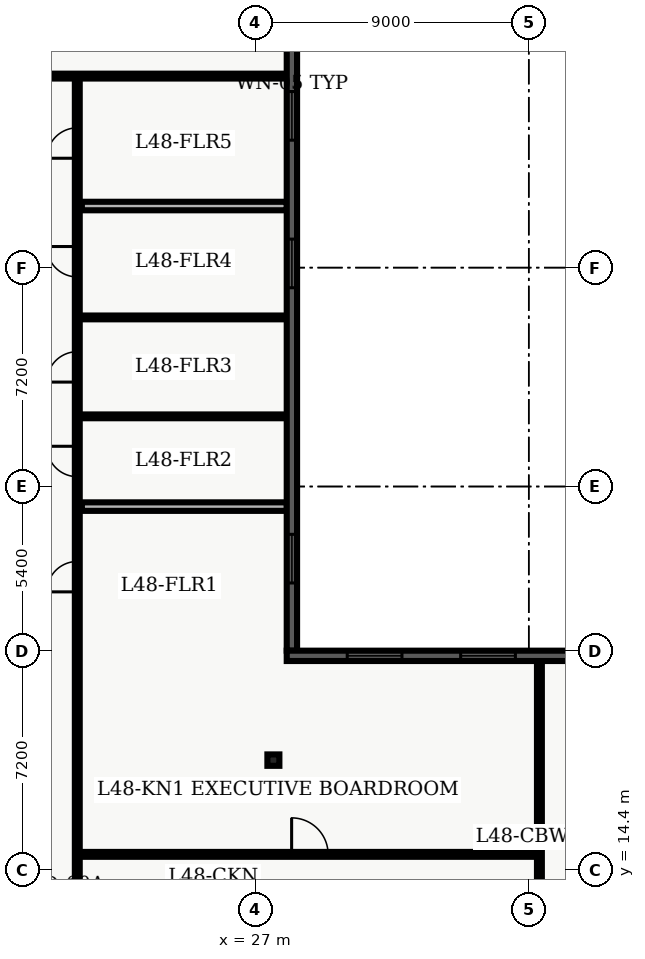
"""IFC4 building model, lengths in metres.
Left out: names, types, materials, properties, quantities, classifications, styles, units other than length and angle.
Written with IfcOpenShell. Run it as: python <this file> out.ifc"""

import sys

from ifc_helpers import new_model, entity, si_unit, converted_unit, direction, frame, origin_with_axes, origin_2d_with_axis, place, context, subcontext, project, spatial, polyline, rectangle, i_section, outline, extrude, element, fill, save


model = new_model("IFC4")
c1 = context("Model", 3, precision=1e-05, world=origin_with_axes(), true_north=direction((0.0, 1.0)))
c2 = subcontext(c1, "Body", "Model", "MODEL_VIEW")
j1 = project(units=[si_unit("LENGTHUNIT", "METRE"), converted_unit("PLANEANGLEUNIT", "DEGREE", entity("IfcPlaneAngleMeasure", 0.017), si_unit("PLANEANGLEUNIT", "RADIAN"), dimensions=[0, 0, 0, 0, 0, 0, 0])], contexts=[c1])
p1 = place(None, origin_with_axes())
s1 = spatial("IfcSite", under=j1, at=p1, CompositionType="ELEMENT")
p2 = place(p1, origin_with_axes())
s2 = spatial("IfcBuilding", under=s1, at=p2, CompositionType="ELEMENT")
p3 = place(p2, frame((0.0, 0.0, 196.5), z_axis=(0.0, 0.0, 1.0), x_axis=(1.0, 0.0, 0.0)))
s3 = spatial("IfcBuildingStorey", under=s2, at=p3, CompositionType="ELEMENT", Elevation=196.5)
p4 = place(p3, frame((27.6, 18.0, 0.0), z_axis=(0.0, 0.0, 1.0), x_axis=(1.0, 0.0, 0.0)))
e1 = element("IfcColumn", 1, at=p4, inside=s3, PredefinedType="COLUMN", context=c2, shape_type="SweptSolid", body=[
    extrude(i_section(OverallWidth=0.394, OverallDepth=0.375, WebThickness=0.017, FlangeThickness=0.028, FilletRadius=0.02, at=origin_2d_with_axis()), origin_with_axes(), (0.0, 0.0, 1.0), 3.9),
])
p5 = place(p3, frame((2.6, 40.5, 0.0), z_axis=(0.0, 0.0, 1.0), x_axis=(1.0, 0.0, 0.0)))
e2 = element("IfcWall", 2, at=p5, inside=s3, PredefinedType="PARTITIONING", context=c2, shape_type="SweptSolid", body=[
    extrude(outline(polyline([(0.0, -0.08), (25.444, -0.08), (25.444, 0.08), (0.0, 0.08), (0.0, -0.08)])), origin_with_axes(), (0.0, 0.0, 1.0), 2.7),
])
p6 = place(p5, frame((1.762, 0.0, 0.0), z_axis=(0.0, 0.0, 1.0), x_axis=(1.0, 0.0, 0.0)))
e3 = element("IfcOpeningElement", 3, at=p6, cuts=e2, PredefinedType="OPENING", context=c2, shape_type="SweptSolid", body=[
    extrude(rectangle(XDim=1.0, YDim=0.18, at=origin_2d_with_axis()), origin_with_axes(), (0.0, 0.0, 1.0), 2.15),
])
p7 = place(p5, frame((6.167, 0.0, 0.0), z_axis=(0.0, 0.0, 1.0), x_axis=(1.0, 0.0, 0.0)))
e4 = element("IfcOpeningElement", 4, at=p7, cuts=e2, PredefinedType="OPENING", context=c2, shape_type="SweptSolid", body=[
    extrude(rectangle(XDim=1.0, YDim=0.18, at=origin_2d_with_axis()), origin_with_axes(), (0.0, 0.0, 1.0), 2.15),
])
p8 = place(p5, frame((10.413, 0.0, 0.0), z_axis=(0.0, 0.0, 1.0), x_axis=(1.0, 0.0, 0.0)))
e5 = element("IfcOpeningElement", 5, at=p8, cuts=e2, PredefinedType="OPENING", context=c2, shape_type="SweptSolid", body=[
    extrude(rectangle(XDim=1.0, YDim=0.18, at=origin_2d_with_axis()), origin_with_axes(), (0.0, 0.0, 1.0), 2.15),
])
p9 = place(p5, frame((14.773, 0.0, 0.0), z_axis=(0.0, 0.0, 1.0), x_axis=(1.0, 0.0, 0.0)))
e6 = element("IfcOpeningElement", 6, at=p9, cuts=e2, PredefinedType="OPENING", context=c2, shape_type="SweptSolid", body=[
    extrude(rectangle(XDim=1.0, YDim=0.18, at=origin_2d_with_axis()), origin_with_axes(), (0.0, 0.0, 1.0), 2.15),
])
p10 = place(p3, frame((21.15, 7.8, 0.0), z_axis=(0.0, 0.0, 1.0), x_axis=(0.0, 1.0, 0.0)))
e7 = element("IfcWall", 7, at=p10, inside=s3, PredefinedType="PARTITIONING", context=c2, shape_type="SweptSolid", body=[
    extrude(outline(polyline([(0.0, -0.08), (32.7, -0.08), (32.7, 0.08), (0.0, 0.08), (0.0, -0.08)])), origin_with_axes(), (0.0, 0.0, 1.0), 2.7),
])
p11 = place(p10, frame((16.235, 0.0, 0.0), z_axis=(0.0, 0.0, 1.0), x_axis=(1.0, 0.0, 0.0)))
e8 = element("IfcOpeningElement", 8, at=p11, cuts=e7, PredefinedType="OPENING", context=c2, shape_type="SweptSolid", body=[
    extrude(rectangle(XDim=1.0, YDim=0.18, at=origin_2d_with_axis()), origin_with_axes(), (0.0, 0.0, 1.0), 2.15),
])
p12 = place(p10, frame((20.023, 0.0, 0.0), z_axis=(0.0, 0.0, 1.0), x_axis=(1.0, 0.0, 0.0)))
e9 = element("IfcOpeningElement", 9, at=p12, cuts=e7, PredefinedType="OPENING", context=c2, shape_type="SweptSolid", body=[
    extrude(rectangle(XDim=1.0, YDim=0.18, at=origin_2d_with_axis()), origin_with_axes(), (0.0, 0.0, 1.0), 2.15),
])
p13 = place(p10, frame((23.135, 0.0, 0.0), z_axis=(0.0, 0.0, 1.0), x_axis=(1.0, 0.0, 0.0)))
e10 = element("IfcOpeningElement", 10, at=p13, cuts=e7, PredefinedType="OPENING", context=c2, shape_type="SweptSolid", body=[
    extrude(rectangle(XDim=1.0, YDim=0.18, at=origin_2d_with_axis()), origin_with_axes(), (0.0, 0.0, 1.0), 2.15),
])
p14 = place(p10, frame((26.594, 0.0, 0.0), z_axis=(0.0, 0.0, 1.0), x_axis=(1.0, 0.0, 0.0)))
e11 = element("IfcOpeningElement", 11, at=p14, cuts=e7, PredefinedType="OPENING", context=c2, shape_type="SweptSolid", body=[
    extrude(rectangle(XDim=1.0, YDim=0.18, at=origin_2d_with_axis()), origin_with_axes(), (0.0, 0.0, 1.0), 2.15),
])
p15 = place(p10, frame((30.498, 0.0, 0.0), z_axis=(0.0, 0.0, 1.0), x_axis=(1.0, 0.0, 0.0)))
e12 = element("IfcOpeningElement", 12, at=p15, cuts=e7, PredefinedType="OPENING", context=c2, shape_type="SweptSolid", body=[
    extrude(rectangle(XDim=1.0, YDim=0.18, at=origin_2d_with_axis()), origin_with_axes(), (0.0, 0.0, 1.0), 2.15),
])
p16 = place(p10, frame((5.775, 0.0, 0.0), z_axis=(0.0, 0.0, 1.0), x_axis=(1.0, 0.0, 0.0)))
e13 = element("IfcOpeningElement", 13, at=p16, cuts=e7, PredefinedType="OPENING", context=c2, shape_type="SweptSolid", body=[
    extrude(rectangle(XDim=1.05, YDim=0.18, at=origin_2d_with_axis()), origin_with_axes(), (0.0, 0.0, 1.0), 2.15),
])
p17 = place(p3, frame((21.3, 26.339, 0.0), z_axis=(0.0, 0.0, 1.0), x_axis=(1.0, 0.0, 0.0)))
e14 = element("IfcWall", 14, at=p17, inside=s3, PredefinedType="PARTITIONING", context=c2, shape_type="SweptSolid", body=[
    extrude(outline(polyline([(0.0, -0.14), (6.744, -0.14), (6.744, 0.14), (0.0, 0.14), (0.0, -0.14)])), origin_with_axes(), (0.0, 0.0, 1.0), 2.7),
])
for number, where, z_axis, x_axis in (
    (15, (21.3, 29.308, 0.0), (0.0, 0.0, 1.0), (1.0, 0.0, 0.0)),
    (16, (21.3, 32.562, 0.0), (0.0, 0.0, 1.0), (1.0, 0.0, 0.0)),
):
    element("IfcWall", number, at=place(p3, frame(where, z_axis=z_axis, x_axis=x_axis)), inside=s3, PredefinedType="PARTITIONING", context=c2, shape_type="SweptSolid", body=[
        extrude(outline(polyline([(0.0, -0.062), (6.744, -0.062), (6.744, 0.062), (0.0, 0.062), (0.0, -0.062)])), origin_with_axes(), (0.0, 0.0, 1.0), 2.7),
    ])
p18 = place(p3, frame((21.3, 36.226, 0.0), z_axis=(0.0, 0.0, 1.0), x_axis=(1.0, 0.0, 0.0)))
e17 = element("IfcWall", 17, at=p18, inside=s3, PredefinedType="PARTITIONING", context=c2, shape_type="SweptSolid", body=[
    extrude(outline(polyline([(0.0, -0.14), (6.744, -0.14), (6.744, 0.14), (0.0, 0.14), (0.0, -0.14)])), origin_with_axes(), (0.0, 0.0, 1.0), 2.7),
])
p19 = place(p3, frame((21.15, 14.9, 0.0), z_axis=(0.0, 0.0, 1.0), x_axis=(1.0, 0.0, 0.0)))
e18 = element("IfcWall", 18, at=p19, inside=s3, PredefinedType="PARTITIONING", context=c2, shape_type="SweptSolid", body=[
    extrude(outline(polyline([(0.0, -0.08), (15.2, -0.08), (15.2, 0.08), (0.0, 0.08), (0.0, -0.08)])), origin_with_axes(), (0.0, 0.0, 1.0), 2.7),
])
p20 = place(p19, frame((7.65, 0.0, 0.0), z_axis=(0.0, 0.0, 1.0), x_axis=(1.0, 0.0, 0.0)))
e19 = element("IfcOpeningElement", 19, at=p20, cuts=e18, PredefinedType="OPENING", context=c2, shape_type="SweptSolid", body=[
    extrude(rectangle(XDim=1.2, YDim=0.18, at=origin_2d_with_axis()), origin_with_axes(), (0.0, 0.0, 1.0), 2.2),
])
p21 = place(p3, frame((36.35, 4.35, 0.0), z_axis=(0.0, 0.0, 1.0), x_axis=(0.0, 1.0, 0.0)))
e20 = element("IfcWall", 20, at=p21, inside=s3, PredefinedType="PARTITIONING", context=c2, shape_type="SweptSolid", body=[
    extrude(outline(polyline([(0.0, -0.08), (16.95, -0.08), (16.95, 0.08), (0.0, 0.08), (0.0, -0.08)])), origin_with_axes(), (0.0, 0.0, 1.0), 2.7),
])
p22 = place(p3, frame((28.209, 42.22, 0.0), z_axis=(0.0, 0.0, 1.0), x_axis=(0.0, -1.0, 0.0)))
e21 = element("IfcWall", 21, at=p22, inside=s3, PredefinedType="SOLIDWALL", context=c2, shape_type="SweptSolid", body=[
    extrude(outline(polyline([(0.0, -0.17), (20.62, -0.17), (20.62, 0.17), (0.0, 0.17), (0.0, -0.17)])), origin_with_axes(), (0.0, 0.0, 1.0), 3.66),
])
p23 = place(p22, frame((3.028, 0.0, 0.45), z_axis=(0.0, 0.0, 1.0), x_axis=(1.0, 0.0, 0.0)))
e22 = element("IfcOpeningElement", 22, at=p23, cuts=e21, PredefinedType="OPENING", context=c2, shape_type="SweptSolid", body=[
    extrude(rectangle(XDim=1.6, YDim=0.36, at=origin_2d_with_axis()), origin_with_axes(), (0.0, 0.0, 1.0), 2.2),
])
p24 = place(p22, frame((7.882, 0.0, 0.45), z_axis=(0.0, 0.0, 1.0), x_axis=(1.0, 0.0, 0.0)))
e23 = element("IfcOpeningElement", 23, at=p24, cuts=e21, PredefinedType="OPENING", context=c2, shape_type="SweptSolid", body=[
    extrude(rectangle(XDim=1.6, YDim=0.36, at=origin_2d_with_axis()), origin_with_axes(), (0.0, 0.0, 1.0), 2.2),
])
p25 = place(p22, frame((17.593, 0.0, 0.45), z_axis=(0.0, 0.0, 1.0), x_axis=(1.0, 0.0, 0.0)))
e24 = element("IfcOpeningElement", 24, at=p25, cuts=e21, PredefinedType="OPENING", context=c2, shape_type="SweptSolid", body=[
    extrude(rectangle(XDim=1.6, YDim=0.36, at=origin_2d_with_axis()), origin_with_axes(), (0.0, 0.0, 1.0), 2.2),
])
p26 = place(p3, frame((28.039, 21.43, 0.0), z_axis=(0.0, 0.0, 1.0), x_axis=(1.0, 0.0, 0.0)))
e25 = element("IfcWall", 25, at=p26, inside=s3, PredefinedType="SOLIDWALL", context=c2, shape_type="SweptSolid", body=[
    extrude(outline(polyline([(0.0, -0.17), (10.361, -0.17), (10.361, 0.17), (0.0, 0.17), (0.0, -0.17)])), origin_with_axes(), (0.0, 0.0, 1.0), 3.66),
])
p27 = place(p26, frame((2.89, 0.0, 0.45), z_axis=(0.0, 0.0, 1.0), x_axis=(1.0, 0.0, 0.0)))
e26 = element("IfcOpeningElement", 26, at=p27, cuts=e25, PredefinedType="OPENING", context=c2, shape_type="SweptSolid", body=[
    extrude(rectangle(XDim=1.8, YDim=0.36, at=origin_2d_with_axis()), origin_with_axes(), (0.0, 0.0, 1.0), 2.1),
])
p28 = place(p26, frame((6.621, 0.0, 0.45), z_axis=(0.0, 0.0, 1.0), x_axis=(1.0, 0.0, 0.0)))
e27 = element("IfcOpeningElement", 27, at=p28, cuts=e25, PredefinedType="OPENING", context=c2, shape_type="SweptSolid", body=[
    extrude(rectangle(XDim=1.8, YDim=0.36, at=origin_2d_with_axis()), origin_with_axes(), (0.0, 0.0, 1.0), 2.1),
])
p29 = place(p10, frame((16.235, 0.0, 0.0), z_axis=(0.0, 0.0, 1.0), x_axis=(1.0, 0.0, 0.0)))
e28 = element("IfcDoor", 28, at=p29, inside=s3, OperationType="SINGLE_SWING_LEFT", PredefinedType="DOOR", context=c2, shape_type="SweptSolid", body=[
    extrude(rectangle(XDim=1.0, YDim=0.09, at=origin_2d_with_axis()), origin_with_axes(), (0.0, 0.0, 1.0), 2.15),
])
fill(e8, e28)
p30 = place(p10, frame((20.023, 0.0, 0.0), z_axis=(0.0, 0.0, 1.0), x_axis=(1.0, 0.0, 0.0)))
e29 = element("IfcDoor", 29, at=p30, inside=s3, OperationType="SINGLE_SWING_RIGHT", PredefinedType="DOOR", context=c2, shape_type="SweptSolid", body=[
    extrude(rectangle(XDim=1.0, YDim=0.09, at=origin_2d_with_axis()), origin_with_axes(), (0.0, 0.0, 1.0), 2.15),
])
fill(e9, e29)
p31 = place(p10, frame((23.135, 0.0, 0.0), z_axis=(0.0, 0.0, 1.0), x_axis=(1.0, 0.0, 0.0)))
e30 = element("IfcDoor", 30, at=p31, inside=s3, OperationType="SINGLE_SWING_LEFT", PredefinedType="DOOR", context=c2, shape_type="SweptSolid", body=[
    extrude(rectangle(XDim=1.0, YDim=0.09, at=origin_2d_with_axis()), origin_with_axes(), (0.0, 0.0, 1.0), 2.15),
])
fill(e10, e30)
p32 = place(p10, frame((26.594, 0.0, 0.0), z_axis=(0.0, 0.0, 1.0), x_axis=(1.0, 0.0, 0.0)))
e31 = element("IfcDoor", 31, at=p32, inside=s3, OperationType="SINGLE_SWING_RIGHT", PredefinedType="DOOR", context=c2, shape_type="SweptSolid", body=[
    extrude(rectangle(XDim=1.0, YDim=0.09, at=origin_2d_with_axis()), origin_with_axes(), (0.0, 0.0, 1.0), 2.15),
])
fill(e11, e31)
p33 = place(p10, frame((30.498, 0.0, 0.0), z_axis=(0.0, 0.0, 1.0), x_axis=(1.0, 0.0, 0.0)))
e32 = element("IfcDoor", 32, at=p33, inside=s3, OperationType="SINGLE_SWING_LEFT", PredefinedType="DOOR", context=c2, shape_type="SweptSolid", body=[
    extrude(rectangle(XDim=1.0, YDim=0.09, at=origin_2d_with_axis()), origin_with_axes(), (0.0, 0.0, 1.0), 2.15),
])
fill(e12, e32)
p34 = place(p10, frame((5.775, 0.0, 0.0), z_axis=(0.0, 0.0, 1.0), x_axis=(1.0, 0.0, 0.0)))
e33 = element("IfcDoor", 33, at=p34, inside=s3, OperationType="SINGLE_SWING_LEFT", PredefinedType="DOOR", context=c2, shape_type="SweptSolid", body=[
    extrude(rectangle(XDim=1.05, YDim=0.09, at=origin_2d_with_axis()), origin_with_axes(), (0.0, 0.0, 1.0), 2.15),
])
fill(e13, e33)
p35 = place(p19, frame((7.65, 0.0, 0.0), z_axis=(0.0, 0.0, 1.0), x_axis=(1.0, 0.0, 0.0)))
e34 = element("IfcDoor", 34, at=p35, inside=s3, OperationType="SINGLE_SWING_LEFT", PredefinedType="DOOR", context=c2, shape_type="SweptSolid", body=[
    extrude(rectangle(XDim=1.2, YDim=0.09, at=origin_2d_with_axis()), origin_with_axes(), (0.0, 0.0, 1.0), 2.2),
])
fill(e19, e34)
p36 = place(p22, frame((3.028, 0.0, 0.45), z_axis=(0.0, 0.0, 1.0), x_axis=(1.0, 0.0, 0.0)))
e35 = element("IfcWindow", 35, at=p36, inside=s3, PredefinedType="WINDOW", context=c2, shape_type="SweptSolid", body=[
    extrude(rectangle(XDim=1.6, YDim=0.09, at=origin_2d_with_axis()), origin_with_axes(), (0.0, 0.0, 1.0), 2.2),
])
fill(e22, e35)
p37 = place(p22, frame((7.882, 0.0, 0.45), z_axis=(0.0, 0.0, 1.0), x_axis=(1.0, 0.0, 0.0)))
e36 = element("IfcWindow", 36, at=p37, inside=s3, PredefinedType="WINDOW", context=c2, shape_type="SweptSolid", body=[
    extrude(rectangle(XDim=1.6, YDim=0.09, at=origin_2d_with_axis()), origin_with_axes(), (0.0, 0.0, 1.0), 2.2),
])
fill(e23, e36)
p38 = place(p22, frame((17.593, 0.0, 0.45), z_axis=(0.0, 0.0, 1.0), x_axis=(1.0, 0.0, 0.0)))
e37 = element("IfcWindow", 37, at=p38, inside=s3, PredefinedType="WINDOW", context=c2, shape_type="SweptSolid", body=[
    extrude(rectangle(XDim=1.6, YDim=0.09, at=origin_2d_with_axis()), origin_with_axes(), (0.0, 0.0, 1.0), 2.2),
])
fill(e24, e37)
p39 = place(p26, frame((2.89, 0.0, 0.45), z_axis=(0.0, 0.0, 1.0), x_axis=(1.0, 0.0, 0.0)))
e38 = element("IfcWindow", 38, at=p39, inside=s3, PredefinedType="WINDOW", context=c2, shape_type="SweptSolid", body=[
    extrude(rectangle(XDim=1.8, YDim=0.09, at=origin_2d_with_axis()), origin_with_axes(), (0.0, 0.0, 1.0), 2.1),
])
fill(e26, e38)
p40 = place(p26, frame((6.621, 0.0, 0.45), z_axis=(0.0, 0.0, 1.0), x_axis=(1.0, 0.0, 0.0)))
e39 = element("IfcWindow", 39, at=p40, inside=s3, PredefinedType="WINDOW", context=c2, shape_type="SweptSolid", body=[
    extrude(rectangle(XDim=1.8, YDim=0.09, at=origin_2d_with_axis()), origin_with_axes(), (0.0, 0.0, 1.0), 2.1),
])
fill(e27, e39)
save(model, sys.argv[1])
